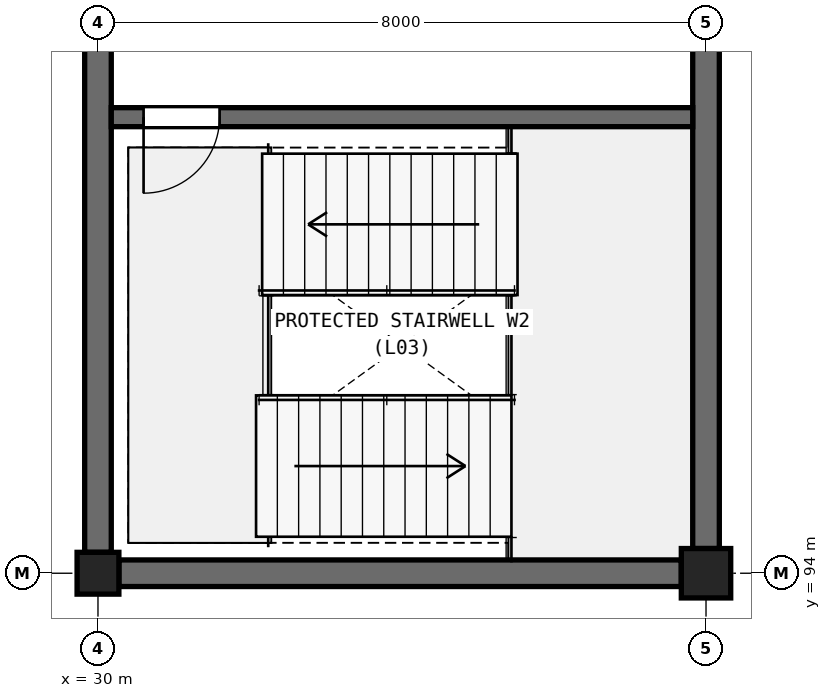
"""IFC4 building model, lengths in metres.
Left out: names, types, materials, properties, quantities, classifications, styles, units other than length and angle.
Written with IfcOpenShell. Run it as: python <this file> out.ifc"""

import sys

from ifc_helpers import new_model, si_unit, direction, frame, frame_2d, origin, origin_2d, place, context, subcontext, project, spatial, rectangle, extrude, element, fill, save


model = new_model("IFC4")
c1 = context("Model", 3, precision=1e-05, world=origin(), true_north=direction((0.0, 1.0)))
c2 = subcontext(c1, "Body", "Model", "MODEL_VIEW")
j1 = project(units=[si_unit("LENGTHUNIT", "METRE"), si_unit("PLANEANGLEUNIT", "RADIAN")], contexts=[c1])
p1 = place(None, origin())
s1 = spatial("IfcSite", under=j1, at=p1, CompositionType="ELEMENT")
p2 = place(p1, origin())
s2 = spatial("IfcBuilding", under=s1, at=p2, CompositionType="ELEMENT")
p3 = place(p2, frame((0.0, 0.0, 15.0)))
s3 = spatial("IfcBuildingStorey", under=s2, at=p3, CompositionType="ELEMENT", Elevation=15.0)
p4 = place(p3, frame((30.0, 94.0, 0.0), z_axis=(0.0, 0.0, 1.0), x_axis=(1.0, 0.0, 0.0)))
e1 = element("IfcColumn", 1, at=p4, inside=s3, PredefinedType="COLUMN", context=c2, shape_type="SweptSolid", body=[
    extrude(rectangle(XDim=0.55, YDim=0.55, at=origin_2d()), origin(), (0.0, 0.0, 1.0), 4.2),
])
p5 = place(p3, frame((38.0, 94.0, 0.0), z_axis=(0.0, 0.0, 1.0), x_axis=(1.0, 0.0, 0.0)))
e2 = element("IfcColumn", 2, at=p5, inside=s3, PredefinedType="COLUMN", context=c2, shape_type="SweptSolid", body=[
    extrude(rectangle(XDim=0.65, YDim=0.65, at=origin_2d()), origin(), (0.0, 0.0, 1.0), 4.2),
])
for number, where, z_axis, x_axis in (
    (3, (30.275, 94.0, 0.0), (0.0, 0.0, 1.0), (1.0, 0.0, 0.0)),
    (4, (30.0, 94.275, 0.0), (0.0, 0.0, 1.0), (0.0, 1.0, 0.0)),
):
    element("IfcWall", number, at=place(p3, frame(where, z_axis=z_axis, x_axis=x_axis)), inside=s3, PredefinedType="SHEAR", context=c2, shape_type="SweptSolid", body=[
        extrude(rectangle(XDim=7.4, YDim=0.35, at=frame_2d((3.7, 0.0))), origin(), (0.0, 0.0, 1.0), 3.98),
    ])
p6 = place(p3, frame((38.0, 94.325, 0.0), z_axis=(0.0, 0.0, 1.0), x_axis=(0.0, 1.0, 0.0)))
e5 = element("IfcWall", 5, at=p6, inside=s3, PredefinedType="SHEAR", context=c2, shape_type="SweptSolid", body=[
    extrude(rectangle(XDim=7.375, YDim=0.35, at=frame_2d((3.688, 0.0))), origin(), (0.0, 0.0, 1.0), 3.98),
])
p7 = place(p3, frame((30.175, 100.0, 0.0), z_axis=(0.0, 0.0, 1.0), x_axis=(1.0, 0.0, 0.0)))
e6 = element("IfcWall", 6, at=p7, inside=s3, PredefinedType="SOLIDWALL", context=c2, shape_type="SweptSolid", body=[
    extrude(rectangle(XDim=7.65, YDim=0.25, at=frame_2d((3.825, 0.0))), origin(), (0.0, 0.0, 1.0), 3.98),
])
p8 = place(p7, frame((0.425, 0.0, 0.0)))
e7 = element("IfcOpeningElement", 7, at=p8, cuts=e6, PredefinedType="OPENING", context=c2, shape_type="SweptSolid", body=[
    extrude(rectangle(XDim=1.0, YDim=2.2, at=frame_2d((0.5, 1.1))), frame((0.0, 0.135, 0.0), z_axis=(0.0, -1.0, 0.0), x_axis=(1.0, 0.0, 0.0)), (0.0, 0.0, 1.0), 0.27),
])
p9 = place(p8, frame((1.0, 0.0, 0.0), z_axis=(0.0, 0.0, 1.0), x_axis=(-1.0, 0.0, 0.0)))
e8 = element("IfcDoor", 8, at=p9, inside=s3, OperationType="SINGLE_SWING_LEFT", PredefinedType="DOOR", context=c2, shape_type="SweptSolid", body=[
    extrude(rectangle(XDim=1.0, YDim=2.2, at=frame_2d((0.5, 1.1))), frame((0.0, 0.025, 0.0), z_axis=(0.0, -1.0, 0.0), x_axis=(1.0, 0.0, 0.0)), (0.0, 0.0, 1.0), 0.05),
])
fill(e7, e8)
save(model, sys.argv[1])
